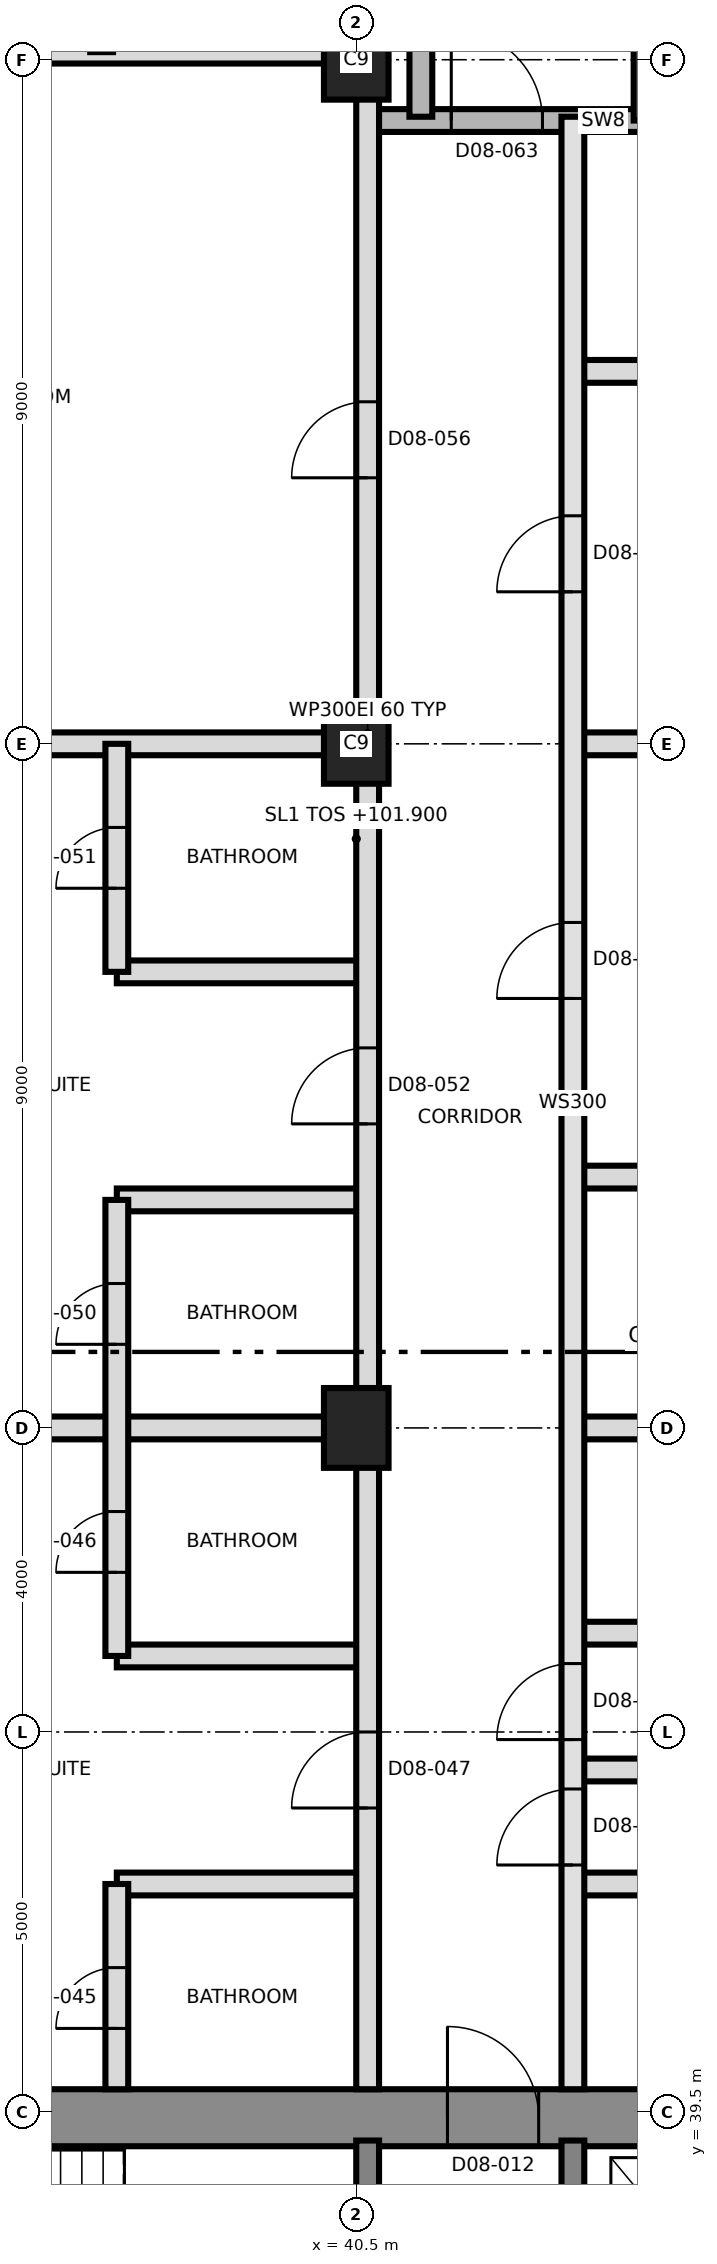
"""IFC4 building model, lengths in metres.
Left out: names, types, materials, properties, quantities, classifications, styles, units other than length and angle.
Written with IfcOpenShell. Run it as: python <this file> out.ifc"""

import sys

from ifc_helpers import new_model, si_unit, direction, frame, frame_2d, origin, origin_2d, place, context, subcontext, project, spatial, rectangle, extrude, element, fill, save


model = new_model("IFC4")
c1 = context("Model", 3, precision=1e-05, world=origin(), true_north=direction((0.0, 1.0)))
c2 = subcontext(c1, "Body", "Model", "MODEL_VIEW")
j1 = project(units=[si_unit("LENGTHUNIT", "METRE"), si_unit("PLANEANGLEUNIT", "RADIAN")], contexts=[c1])
p1 = place(None, origin())
s1 = spatial("IfcSite", under=j1, at=p1, CompositionType="ELEMENT")
p2 = place(p1, origin())
s2 = spatial("IfcBuilding", under=s1, at=p2, CompositionType="ELEMENT")
p3 = place(p2, frame((0.0, 0.0, 101.9)))
s3 = spatial("IfcBuildingStorey", under=s2, at=p3, CompositionType="ELEMENT", Elevation=101.9)
p4 = place(p3, frame((31.125, 39.425, 0.0), z_axis=(0.0, 0.0, 1.0), x_axis=(1.0, 0.0, 0.0)))
e1 = element("IfcWall", 1, at=p4, inside=s3, PredefinedType="SHEAR", context=c2, shape_type="SweptSolid", body=[
    extrude(rectangle(XDim=27.0, YDim=0.75, at=frame_2d((13.5, 0.0))), origin(), (0.0, 0.0, 1.0), 3.7),
])
p5 = place(p4, frame((10.575, 0.0, 0.0)))
e2 = element("IfcOpeningElement", 2, at=p5, cuts=e1, PredefinedType="OPENING", context=c2, shape_type="SweptSolid", body=[
    extrude(rectangle(XDim=1.2, YDim=2.1, at=frame_2d((0.6, 1.05))), frame((0.0, 0.385, 0.0), z_axis=(0.0, -1.0, 0.0), x_axis=(1.0, 0.0, 0.0)), (0.0, 0.0, 1.0), 0.77),
])
for number, where, z_axis, x_axis in (
    (3, (40.65, 33.5, 0.0), (0.0, 0.0, 1.0), (0.0, 1.0, 0.0)),
    (4, (43.35, 33.5, 0.0), (0.0, 0.0, 1.0), (0.0, 1.0, 0.0)),
):
    element("IfcWall", number, at=place(p3, frame(where, z_axis=z_axis, x_axis=x_axis)), inside=s3, PredefinedType="SHEAR", context=c2, shape_type="SweptSolid", body=[
        extrude(rectangle(XDim=5.625, YDim=0.3, at=frame_2d((2.812, 0.0))), origin(), (0.0, 0.0, 1.0), 3.7),
    ])
for number, where, z_axis, x_axis in (
    (5, (40.5, 48.5, 0.0), (0.0, 0.0, 1.0), (0.0, 1.0, 0.0)),
    (6, (40.5, 57.5, 0.0), (0.0, 0.0, 1.0), (0.0, 1.0, 0.0)),
    (7, (40.5, 66.5, 0.0), (0.0, 0.0, 1.0), (0.0, 1.0, 0.0)),
):
    element("IfcColumn", number, at=place(p3, frame(where, z_axis=z_axis, x_axis=x_axis)), inside=s3, PredefinedType="COLUMN", context=c2, shape_type="SweptSolid", body=[
        extrude(rectangle(XDim=1.05, YDim=0.85, at=origin_2d()), origin(), (0.0, 0.0, 1.0), 3.7),
    ])
for number, where, z_axis, x_axis in (
    (8, (37.35, 42.5, 0.0), (0.0, 0.0, 1.0), (1.0, 0.0, 0.0)),
    (9, (43.35, 42.5, 0.0), (0.0, 0.0, 1.0), (1.0, 0.0, 0.0)),
):
    element("IfcWall", number, at=place(p3, frame(where, z_axis=z_axis, x_axis=x_axis)), inside=s3, PredefinedType="PARTITIONING", context=c2, shape_type="SweptSolid", body=[
        extrude(rectangle(XDim=3.3, YDim=0.3, at=frame_2d((1.65, 0.0))), origin(), (0.0, 0.0, 1.0), 3.4),
    ])
p6 = place(p3, frame((43.35, 44.0, 0.0), z_axis=(0.0, 0.0, 1.0), x_axis=(1.0, 0.0, 0.0)))
e10 = element("IfcWall", 10, at=p6, inside=s3, PredefinedType="PARTITIONING", context=c2, shape_type="SweptSolid", body=[
    extrude(rectangle(XDim=6.596, YDim=0.3, at=frame_2d((3.298, 0.0))), origin(), (0.0, 0.0, 1.0), 3.4),
])
p7 = place(p3, frame((37.35, 45.5, 0.0), z_axis=(0.0, 0.0, 1.0), x_axis=(1.0, 0.0, 0.0)))
e11 = element("IfcWall", 11, at=p7, inside=s3, PredefinedType="PARTITIONING", context=c2, shape_type="SweptSolid", body=[
    extrude(rectangle(XDim=3.3, YDim=0.3, at=frame_2d((1.65, 0.0))), origin(), (0.0, 0.0, 1.0), 3.4),
])
p8 = place(p3, frame((43.35, 45.8, 0.0), z_axis=(0.0, 0.0, 1.0), x_axis=(1.0, 0.0, 0.0)))
e12 = element("IfcWall", 12, at=p8, inside=s3, PredefinedType="PARTITIONING", context=c2, shape_type="SweptSolid", body=[
    extrude(rectangle(XDim=3.2, YDim=0.3, at=frame_2d((1.6, 0.0))), origin(), (0.0, 0.0, 1.0), 3.4),
])
p9 = place(p3, frame((31.53, 48.5, 0.0), z_axis=(0.0, 0.0, 1.0), x_axis=(1.0, 0.0, 0.0)))
e13 = element("IfcWall", 13, at=p9, inside=s3, PredefinedType="PARTITIONING", context=c2, shape_type="SweptSolid", body=[
    extrude(rectangle(XDim=9.12, YDim=0.3, at=frame_2d((4.56, 0.0))), origin(), (0.0, 0.0, 1.0), 3.4),
])
p10 = place(p3, frame((43.35, 48.5, 0.0), z_axis=(0.0, 0.0, 1.0), x_axis=(1.0, 0.0, 0.0)))
e14 = element("IfcWall", 14, at=p10, inside=s3, PredefinedType="PARTITIONING", context=c2, shape_type="SweptSolid", body=[
    extrude(rectangle(XDim=6.12, YDim=0.3, at=frame_2d((3.06, 0.0))), origin(), (0.0, 0.0, 1.0), 3.4),
])
p11 = place(p3, frame((37.35, 51.5, 0.0), z_axis=(0.0, 0.0, 1.0), x_axis=(1.0, 0.0, 0.0)))
e15 = element("IfcWall", 15, at=p11, inside=s3, PredefinedType="PARTITIONING", context=c2, shape_type="SweptSolid", body=[
    extrude(rectangle(XDim=3.3, YDim=0.3, at=frame_2d((1.65, 0.0))), origin(), (0.0, 0.0, 1.0), 3.4),
])
p12 = place(p3, frame((43.35, 51.8, 0.0), z_axis=(0.0, 0.0, 1.0), x_axis=(1.0, 0.0, 0.0)))
e16 = element("IfcWall", 16, at=p12, inside=s3, PredefinedType="PARTITIONING", context=c2, shape_type="SweptSolid", body=[
    extrude(rectangle(XDim=3.5, YDim=0.3, at=frame_2d((1.75, 0.0))), origin(), (0.0, 0.0, 1.0), 3.4),
])
p13 = place(p3, frame((37.35, 54.5, 0.0), z_axis=(0.0, 0.0, 1.0), x_axis=(1.0, 0.0, 0.0)))
e17 = element("IfcWall", 17, at=p13, inside=s3, PredefinedType="PARTITIONING", context=c2, shape_type="SweptSolid", body=[
    extrude(rectangle(XDim=3.3, YDim=0.3, at=frame_2d((1.65, 0.0))), origin(), (0.0, 0.0, 1.0), 3.4),
])
p14 = place(p3, frame((31.53, 57.5, 0.0), z_axis=(0.0, 0.0, 1.0), x_axis=(1.0, 0.0, 0.0)))
e18 = element("IfcWall", 18, at=p14, inside=s3, PredefinedType="PARTITIONING", context=c2, shape_type="SweptSolid", body=[
    extrude(rectangle(XDim=9.12, YDim=0.3, at=frame_2d((4.56, 0.0))), origin(), (0.0, 0.0, 1.0), 3.4),
])
p15 = place(p3, frame((43.35, 57.5, 0.0), z_axis=(0.0, 0.0, 1.0), x_axis=(1.0, 0.0, 0.0)))
e19 = element("IfcWall", 19, at=p15, inside=s3, PredefinedType="PARTITIONING", context=c2, shape_type="SweptSolid", body=[
    extrude(rectangle(XDim=6.12, YDim=0.3, at=frame_2d((3.06, 0.0))), origin(), (0.0, 0.0, 1.0), 3.4),
])
p16 = place(p3, frame((43.35, 62.4, 0.0), z_axis=(0.0, 0.0, 1.0), x_axis=(1.0, 0.0, 0.0)))
e20 = element("IfcWall", 20, at=p16, inside=s3, PredefinedType="PARTITIONING", context=c2, shape_type="SweptSolid", body=[
    extrude(rectangle(XDim=6.3, YDim=0.3, at=frame_2d((3.15, 0.0))), origin(), (0.0, 0.0, 1.0), 3.4),
])
p17 = place(p16, frame((4.65, 0.0, 0.0)))
e21 = element("IfcOpeningElement", 21, at=p17, cuts=e20, PredefinedType="OPENING", context=c2, shape_type="SweptSolid", body=[
    extrude(rectangle(XDim=1.0, YDim=2.1, at=frame_2d((0.5, 1.05))), frame((0.0, 0.16, 0.0), z_axis=(0.0, -1.0, 0.0), x_axis=(1.0, 0.0, 0.0)), (0.0, 0.0, 1.0), 0.32),
])
p18 = place(p3, frame((40.65, 65.7, 0.0), z_axis=(0.0, 0.0, 1.0), x_axis=(1.0, 0.0, 0.0)))
e22 = element("IfcWall", 22, at=p18, inside=s3, PredefinedType="SHEAR", context=c2, shape_type="SweptSolid", body=[
    extrude(rectangle(XDim=6.2, YDim=0.3, at=frame_2d((3.1, 0.0))), origin(), (0.0, 0.0, 1.0), 3.4),
])
p19 = place(p18, frame((1.1, 0.0, 0.0)))
e23 = element("IfcOpeningElement", 23, at=p19, cuts=e22, PredefinedType="OPENING", context=c2, shape_type="SweptSolid", body=[
    extrude(rectangle(XDim=1.2, YDim=2.1, at=frame_2d((0.6, 1.05))), frame((0.0, 0.16, 0.0), z_axis=(0.0, -1.0, 0.0), x_axis=(1.0, 0.0, 0.0)), (0.0, 0.0, 1.0), 0.32),
])
p20 = place(p3, frame((31.53, 66.6, 0.0), z_axis=(0.0, 0.0, 1.0), x_axis=(1.0, 0.0, 0.0)))
e24 = element("IfcWall", 24, at=p20, inside=s3, PredefinedType="PARTITIONING", context=c2, shape_type="SweptSolid", body=[
    extrude(rectangle(XDim=9.12, YDim=0.3, at=frame_2d((4.56, 0.0))), origin(), (0.0, 0.0, 1.0), 3.4),
])
p21 = place(p20, frame((3.47, 0.0, 0.0)))
e25 = element("IfcOpeningElement", 25, at=p21, cuts=e24, PredefinedType="OPENING", context=c2, shape_type="SweptSolid", body=[
    extrude(rectangle(XDim=1.0, YDim=2.1, at=frame_2d((0.5, 1.05))), frame((0.0, 0.16, 0.0), z_axis=(0.0, -1.0, 0.0), x_axis=(1.0, 0.0, 0.0)), (0.0, 0.0, 1.0), 0.32),
])
p22 = place(p3, frame((37.35, 39.8, 0.0), z_axis=(0.0, 0.0, 1.0), x_axis=(0.0, 1.0, 0.0)))
e26 = element("IfcWall", 26, at=p22, inside=s3, PredefinedType="PARTITIONING", context=c2, shape_type="SweptSolid", body=[
    extrude(rectangle(XDim=2.7, YDim=0.3, at=frame_2d((1.35, 0.0))), origin(), (0.0, 0.0, 1.0), 3.4),
])
p23 = place(p22, frame((0.8, 0.0, 0.0)))
e27 = element("IfcOpeningElement", 27, at=p23, cuts=e26, PredefinedType="OPENING", context=c2, shape_type="SweptSolid", body=[
    extrude(rectangle(XDim=0.8, YDim=2.1, at=frame_2d((0.4, 1.05))), frame((0.0, 0.16, 0.0), z_axis=(0.0, -1.0, 0.0), x_axis=(1.0, 0.0, 0.0)), (0.0, 0.0, 1.0), 0.32),
])
p24 = place(p3, frame((37.35, 45.5, 0.0), z_axis=(0.0, 0.0, 1.0), x_axis=(0.0, 1.0, 0.0)))
e28 = element("IfcWall", 28, at=p24, inside=s3, PredefinedType="PARTITIONING", context=c2, shape_type="SweptSolid", body=[
    extrude(rectangle(XDim=6.0, YDim=0.3, at=frame_2d((3.0, 0.0))), origin(), (0.0, 0.0, 1.0), 3.4),
])
p25 = place(p24, frame((1.1, 0.0, 0.0)))
e29 = element("IfcOpeningElement", 29, at=p25, cuts=e28, PredefinedType="OPENING", context=c2, shape_type="SweptSolid", body=[
    extrude(rectangle(XDim=0.8, YDim=2.1, at=frame_2d((0.4, 1.05))), frame((0.0, 0.16, 0.0), z_axis=(0.0, -1.0, 0.0), x_axis=(1.0, 0.0, 0.0)), (0.0, 0.0, 1.0), 0.32),
])
p26 = place(p24, frame((4.1, 0.0, 0.0)))
e30 = element("IfcOpeningElement", 30, at=p26, cuts=e28, PredefinedType="OPENING", context=c2, shape_type="SweptSolid", body=[
    extrude(rectangle(XDim=0.8, YDim=2.1, at=frame_2d((0.4, 1.05))), frame((0.0, 0.16, 0.0), z_axis=(0.0, -1.0, 0.0), x_axis=(1.0, 0.0, 0.0)), (0.0, 0.0, 1.0), 0.32),
])
p27 = place(p3, frame((37.35, 54.5, 0.0), z_axis=(0.0, 0.0, 1.0), x_axis=(0.0, 1.0, 0.0)))
e31 = element("IfcWall", 31, at=p27, inside=s3, PredefinedType="PARTITIONING", context=c2, shape_type="SweptSolid", body=[
    extrude(rectangle(XDim=3.0, YDim=0.3, at=frame_2d((1.5, 0.0))), origin(), (0.0, 0.0, 1.0), 3.4),
])
p28 = place(p27, frame((1.1, 0.0, 0.0)))
e32 = element("IfcOpeningElement", 32, at=p28, cuts=e31, PredefinedType="OPENING", context=c2, shape_type="SweptSolid", body=[
    extrude(rectangle(XDim=0.8, YDim=2.1, at=frame_2d((0.4, 1.05))), frame((0.0, 0.16, 0.0), z_axis=(0.0, -1.0, 0.0), x_axis=(1.0, 0.0, 0.0)), (0.0, 0.0, 1.0), 0.32),
])
p29 = place(p3, frame((40.65, 39.8, 0.0), z_axis=(0.0, 0.0, 1.0), x_axis=(0.0, 1.0, 0.0)))
e33 = element("IfcWall", 33, at=p29, inside=s3, PredefinedType="PARTITIONING", context=c2, shape_type="SweptSolid", body=[
    extrude(rectangle(XDim=35.67, YDim=0.3, at=frame_2d((17.835, 0.0))), origin(), (0.0, 0.0, 1.0), 3.4),
])
p30 = place(p29, frame((3.7, 0.0, 0.0)))
e34 = element("IfcOpeningElement", 34, at=p30, cuts=e33, PredefinedType="OPENING", context=c2, shape_type="SweptSolid", body=[
    extrude(rectangle(XDim=1.0, YDim=2.4, at=frame_2d((0.5, 1.2))), frame((0.0, 0.16, 0.0), z_axis=(0.0, -1.0, 0.0), x_axis=(1.0, 0.0, 0.0)), (0.0, 0.0, 1.0), 0.32),
])
p31 = place(p29, frame((12.7, 0.0, 0.0)))
e35 = element("IfcOpeningElement", 35, at=p31, cuts=e33, PredefinedType="OPENING", context=c2, shape_type="SweptSolid", body=[
    extrude(rectangle(XDim=1.0, YDim=2.4, at=frame_2d((0.5, 1.2))), frame((0.0, 0.16, 0.0), z_axis=(0.0, -1.0, 0.0), x_axis=(1.0, 0.0, 0.0)), (0.0, 0.0, 1.0), 0.32),
])
p32 = place(p29, frame((21.2, 0.0, 0.0)))
e36 = element("IfcOpeningElement", 36, at=p32, cuts=e33, PredefinedType="OPENING", context=c2, shape_type="SweptSolid", body=[
    extrude(rectangle(XDim=1.0, YDim=2.4, at=frame_2d((0.5, 1.2))), frame((0.0, 0.16, 0.0), z_axis=(0.0, -1.0, 0.0), x_axis=(1.0, 0.0, 0.0)), (0.0, 0.0, 1.0), 0.32),
])
p33 = place(p3, frame((41.35, 65.75, 0.0), z_axis=(0.0, 0.0, 1.0), x_axis=(0.0, 1.0, 0.0)))
e37 = element("IfcWall", 37, at=p33, inside=s3, PredefinedType="SHEAR", context=c2, shape_type="SweptSolid", body=[
    extrude(rectangle(XDim=8.85, YDim=0.3, at=frame_2d((4.425, 0.0))), origin(), (0.0, 0.0, 1.0), 3.4),
])
p34 = place(p3, frame((43.35, 39.8, 0.0), z_axis=(0.0, 0.0, 1.0), x_axis=(0.0, 1.0, 0.0)))
e38 = element("IfcWall", 38, at=p34, inside=s3, PredefinedType="SOLIDWALL", context=c2, shape_type="SweptSolid", body=[
    extrude(rectangle(XDim=25.95, YDim=0.3, at=frame_2d((12.975, 0.0))), origin(), (0.0, 0.0, 1.0), 3.4),
])
p35 = place(p34, frame((2.95, 0.0, 0.0)))
e39 = element("IfcOpeningElement", 39, at=p35, cuts=e38, PredefinedType="OPENING", context=c2, shape_type="SweptSolid", body=[
    extrude(rectangle(XDim=1.0, YDim=2.1, at=frame_2d((0.5, 1.05))), frame((0.0, 0.16, 0.0), z_axis=(0.0, -1.0, 0.0), x_axis=(1.0, 0.0, 0.0)), (0.0, 0.0, 1.0), 0.32),
])
p36 = place(p34, frame((4.6, 0.0, 0.0)))
e40 = element("IfcOpeningElement", 40, at=p36, cuts=e38, PredefinedType="OPENING", context=c2, shape_type="SweptSolid", body=[
    extrude(rectangle(XDim=1.0, YDim=2.1, at=frame_2d((0.5, 1.05))), frame((0.0, 0.16, 0.0), z_axis=(0.0, -1.0, 0.0), x_axis=(1.0, 0.0, 0.0)), (0.0, 0.0, 1.0), 0.32),
])
p37 = place(p34, frame((14.35, 0.0, 0.0)))
e41 = element("IfcOpeningElement", 41, at=p37, cuts=e38, PredefinedType="OPENING", context=c2, shape_type="SweptSolid", body=[
    extrude(rectangle(XDim=1.0, YDim=2.4, at=frame_2d((0.5, 1.2))), frame((0.0, 0.16, 0.0), z_axis=(0.0, -1.0, 0.0), x_axis=(1.0, 0.0, 0.0)), (0.0, 0.0, 1.0), 0.32),
])
p38 = place(p34, frame((19.7, 0.0, 0.0)))
e42 = element("IfcOpeningElement", 42, at=p38, cuts=e38, PredefinedType="OPENING", context=c2, shape_type="SweptSolid", body=[
    extrude(rectangle(XDim=1.0, YDim=2.4, at=frame_2d((0.5, 1.2))), frame((0.0, 0.16, 0.0), z_axis=(0.0, -1.0, 0.0), x_axis=(1.0, 0.0, 0.0)), (0.0, 0.0, 1.0), 0.32),
])
p39 = place(p3, frame((44.3, 65.7, 0.0), z_axis=(0.0, 0.0, 1.0), x_axis=(0.0, 1.0, 0.0)))
e43 = element("IfcWall", 43, at=p39, inside=s3, PredefinedType="SHEAR", context=c2, shape_type="SweptSolid", body=[
    extrude(rectangle(XDim=8.9, YDim=0.3, at=frame_2d((4.45, 0.0))), origin(), (0.0, 0.0, 1.0), 3.4),
])
p40 = place(p5, origin())
e44 = element("IfcDoor", 44, at=p40, inside=s3, OperationType="SINGLE_SWING_RIGHT", PredefinedType="DOOR", context=c2, shape_type="SweptSolid", body=[
    extrude(rectangle(XDim=1.2, YDim=2.1, at=frame_2d((0.6, 1.05))), frame((0.0, 0.025, 0.0), z_axis=(0.0, -1.0, 0.0), x_axis=(1.0, 0.0, 0.0)), (0.0, 0.0, 1.0), 0.05),
])
fill(e2, e44)
p41 = place(p35, origin())
e45 = element("IfcDoor", 45, at=p41, inside=s3, OperationType="SINGLE_SWING_LEFT", PredefinedType="DOOR", context=c2, shape_type="SweptSolid", body=[
    extrude(rectangle(XDim=1.0, YDim=2.1, at=frame_2d((0.5, 1.05))), frame((0.0, 0.025, 0.0), z_axis=(0.0, -1.0, 0.0), x_axis=(1.0, 0.0, 0.0)), (0.0, 0.0, 1.0), 0.05),
])
fill(e39, e45)
p42 = place(p36, origin())
e46 = element("IfcDoor", 46, at=p42, inside=s3, OperationType="SINGLE_SWING_LEFT", PredefinedType="DOOR", context=c2, shape_type="SweptSolid", body=[
    extrude(rectangle(XDim=1.0, YDim=2.1, at=frame_2d((0.5, 1.05))), frame((0.0, 0.025, 0.0), z_axis=(0.0, -1.0, 0.0), x_axis=(1.0, 0.0, 0.0)), (0.0, 0.0, 1.0), 0.05),
])
fill(e40, e46)
p43 = place(p23, origin())
e47 = element("IfcDoor", 47, at=p43, inside=s3, OperationType="SINGLE_SWING_LEFT", PredefinedType="DOOR", context=c2, shape_type="SweptSolid", body=[
    extrude(rectangle(XDim=0.8, YDim=2.1, at=frame_2d((0.4, 1.05))), frame((0.0, 0.025, 0.0), z_axis=(0.0, -1.0, 0.0), x_axis=(1.0, 0.0, 0.0)), (0.0, 0.0, 1.0), 0.05),
])
fill(e27, e47)
p44 = place(p25, origin())
e48 = element("IfcDoor", 48, at=p44, inside=s3, OperationType="SINGLE_SWING_LEFT", PredefinedType="DOOR", context=c2, shape_type="SweptSolid", body=[
    extrude(rectangle(XDim=0.8, YDim=2.1, at=frame_2d((0.4, 1.05))), frame((0.0, 0.025, 0.0), z_axis=(0.0, -1.0, 0.0), x_axis=(1.0, 0.0, 0.0)), (0.0, 0.0, 1.0), 0.05),
])
fill(e29, e48)
p45 = place(p30, origin())
e49 = element("IfcDoor", 49, at=p45, inside=s3, OperationType="SINGLE_SWING_RIGHT", PredefinedType="DOOR", context=c2, shape_type="SweptSolid", body=[
    extrude(rectangle(XDim=1.0, YDim=2.4, at=frame_2d((0.5, 1.2))), frame((0.0, 0.025, 0.0), z_axis=(0.0, -1.0, 0.0), x_axis=(1.0, 0.0, 0.0)), (0.0, 0.0, 1.0), 0.05),
])
fill(e34, e49)
p46 = place(p37, origin())
e50 = element("IfcDoor", 50, at=p46, inside=s3, OperationType="SINGLE_SWING_RIGHT", PredefinedType="DOOR", context=c2, shape_type="SweptSolid", body=[
    extrude(rectangle(XDim=1.0, YDim=2.4, at=frame_2d((0.5, 1.2))), frame((0.0, 0.025, 0.0), z_axis=(0.0, -1.0, 0.0), x_axis=(1.0, 0.0, 0.0)), (0.0, 0.0, 1.0), 0.05),
])
fill(e41, e50)
p47 = place(p26, origin())
e51 = element("IfcDoor", 51, at=p47, inside=s3, OperationType="SINGLE_SWING_RIGHT", PredefinedType="DOOR", context=c2, shape_type="SweptSolid", body=[
    extrude(rectangle(XDim=0.8, YDim=2.1, at=frame_2d((0.4, 1.05))), frame((0.0, 0.025, 0.0), z_axis=(0.0, -1.0, 0.0), x_axis=(1.0, 0.0, 0.0)), (0.0, 0.0, 1.0), 0.05),
])
fill(e30, e51)
p48 = place(p28, origin())
e52 = element("IfcDoor", 52, at=p48, inside=s3, OperationType="SINGLE_SWING_LEFT", PredefinedType="DOOR", context=c2, shape_type="SweptSolid", body=[
    extrude(rectangle(XDim=0.8, YDim=2.1, at=frame_2d((0.4, 1.05))), frame((0.0, 0.025, 0.0), z_axis=(0.0, -1.0, 0.0), x_axis=(1.0, 0.0, 0.0)), (0.0, 0.0, 1.0), 0.05),
])
fill(e32, e52)
p49 = place(p31, origin())
e53 = element("IfcDoor", 53, at=p49, inside=s3, OperationType="SINGLE_SWING_LEFT", PredefinedType="DOOR", context=c2, shape_type="SweptSolid", body=[
    extrude(rectangle(XDim=1.0, YDim=2.4, at=frame_2d((0.5, 1.2))), frame((0.0, 0.025, 0.0), z_axis=(0.0, -1.0, 0.0), x_axis=(1.0, 0.0, 0.0)), (0.0, 0.0, 1.0), 0.05),
])
fill(e35, e53)
p50 = place(p38, origin())
e54 = element("IfcDoor", 54, at=p50, inside=s3, OperationType="SINGLE_SWING_LEFT", PredefinedType="DOOR", context=c2, shape_type="SweptSolid", body=[
    extrude(rectangle(XDim=1.0, YDim=2.4, at=frame_2d((0.5, 1.2))), frame((0.0, 0.025, 0.0), z_axis=(0.0, -1.0, 0.0), x_axis=(1.0, 0.0, 0.0)), (0.0, 0.0, 1.0), 0.05),
])
fill(e42, e54)
p51 = place(p32, origin())
e55 = element("IfcDoor", 55, at=p51, inside=s3, OperationType="SINGLE_SWING_LEFT", PredefinedType="DOOR", context=c2, shape_type="SweptSolid", body=[
    extrude(rectangle(XDim=1.0, YDim=2.4, at=frame_2d((0.5, 1.2))), frame((0.0, 0.025, 0.0), z_axis=(0.0, -1.0, 0.0), x_axis=(1.0, 0.0, 0.0)), (0.0, 0.0, 1.0), 0.05),
])
fill(e36, e55)
p52 = place(p19, origin())
e56 = element("IfcDoor", 56, at=p52, inside=s3, OperationType="SINGLE_SWING_RIGHT", PredefinedType="DOOR", context=c2, shape_type="SweptSolid", body=[
    extrude(rectangle(XDim=1.2, YDim=2.1, at=frame_2d((0.6, 1.05))), frame((0.0, 0.025, 0.0), z_axis=(0.0, -1.0, 0.0), x_axis=(1.0, 0.0, 0.0)), (0.0, 0.0, 1.0), 0.05),
])
fill(e23, e56)
save(model, sys.argv[1])
